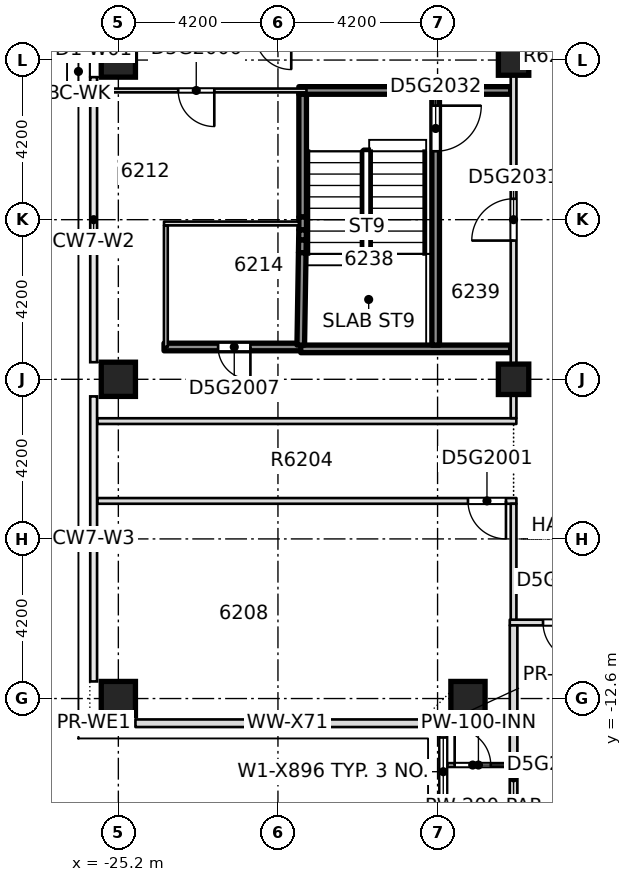
"""IFC4 building model, lengths in metres.
Left out: names, types, materials, properties, quantities, classifications, styles, units other than length and angle.
Written with IfcOpenShell. Run it as: python <this file> out.ifc"""

import sys

from ifc_helpers import new_model, si_unit, direction, frame, frame_2d, origin, origin_2d, place, context, subcontext, project, spatial, rectangle, extrude, element, fill, save


model = new_model("IFC4")
c1 = context("Model", 3, precision=1e-05, world=origin(), true_north=direction((0.0, 1.0)))
c2 = subcontext(c1, "Body", "Model", "MODEL_VIEW")
j1 = project(units=[si_unit("LENGTHUNIT", "METRE"), si_unit("PLANEANGLEUNIT", "RADIAN")], contexts=[c1])
p1 = place(None, origin())
s1 = spatial("IfcSite", under=j1, at=p1, CompositionType="ELEMENT")
p2 = place(p1, origin())
s2 = spatial("IfcBuilding", under=s1, at=p2, CompositionType="ELEMENT")
p3 = place(p2, frame((0.0, 0.0, 237.25)))
s3 = spatial("IfcBuildingStorey", under=s2, at=p3, CompositionType="ELEMENT", Elevation=237.25)
for number, where, z_axis, x_axis in (
    (1, (-25.2, -12.6, -0.4), (0.0, 0.0, 1.0), (1.0, 0.0, 0.0)),
    (2, (-16.0, -12.6, -0.4), (0.0, 0.0, 1.0), (1.0, 0.0, 0.0)),
    (3, (-25.2, -4.2, -0.4), (0.0, 0.0, 1.0), (1.0, 0.0, 0.0)),
    (4, (-25.2, 4.2, -0.4), (0.0, 0.0, 1.0), (1.0, 0.0, 0.0)),
):
    element("IfcColumn", number, at=place(p3, frame(where, z_axis=z_axis, x_axis=x_axis)), inside=s3, PredefinedType="COLUMN", context=c2, shape_type="SweptSolid", body=[
        extrude(rectangle(XDim=0.9, YDim=0.9, at=origin_2d()), origin(), (0.0, 0.0, 1.0), 3.45),
    ])
for number, where, z_axis, x_axis in (
    (5, (-14.8, -4.2, -0.4), (0.0, 0.0, 1.0), (1.0, 0.0, 0.0)),
    (6, (-14.8, 4.2, -0.4), (0.0, 0.0, 1.0), (1.0, 0.0, 0.0)),
):
    element("IfcColumn", number, at=place(p3, frame(where, z_axis=z_axis, x_axis=x_axis)), inside=s3, PredefinedType="COLUMN", context=c2, shape_type="SweptSolid", body=[
        extrude(rectangle(XDim=0.8, YDim=0.8, at=origin_2d()), origin(), (0.0, 0.0, 1.0), 3.45),
    ])
p4 = place(p3, frame((-16.55, -14.35, 0.0), z_axis=(0.0, 0.0, 1.0), x_axis=(1.0, 0.0, 0.0)))
e7 = element("IfcWall", 7, at=p4, inside=s3, PredefinedType="PARTITIONING", context=c2, shape_type="SweptSolid", body=[
    extrude(rectangle(XDim=1.65, YDim=0.1, at=frame_2d((0.825, 0.0))), origin(), (0.0, 0.0, 1.0), 3.05),
])
p5 = place(p4, frame((0.2, 0.0, 0.0)))
e8 = element("IfcOpeningElement", 8, at=p5, cuts=e7, PredefinedType="OPENING", context=c2, shape_type="SweptSolid", body=[
    extrude(rectangle(XDim=0.95, YDim=2.1, at=frame_2d((0.475, 1.05))), frame((0.0, 0.06, 0.0), z_axis=(0.0, -1.0, 0.0), x_axis=(1.0, 0.0, 0.0)), (0.0, 0.0, 1.0), 0.12),
])
p6 = place(p3, frame((-14.9, -10.6, 0.0), z_axis=(0.0, 0.0, 1.0), x_axis=(1.0, 0.0, 0.0)))
e9 = element("IfcWall", 9, at=p6, inside=s3, PredefinedType="PARTITIONING", context=c2, shape_type="SweptSolid", body=[
    extrude(rectangle(XDim=20.8, YDim=0.15, at=frame_2d((10.4, 0.0))), origin(), (0.0, 0.0, 1.0), 3.05),
])
p7 = place(p6, frame((9.225, 0.0, 0.0)))
e10 = element("IfcOpeningElement", 10, at=p7, cuts=e9, PredefinedType="OPENING", context=c2, shape_type="SweptSolid", body=[
    extrude(rectangle(XDim=0.95, YDim=2.1, at=frame_2d((0.475, 1.05))), frame((0.0, 0.085, 0.0), z_axis=(0.0, -1.0, 0.0), x_axis=(1.0, 0.0, 0.0)), (0.0, 0.0, 1.0), 0.17),
])
p8 = place(p6, frame((18.275, 0.0, 0.0)))
e11 = element("IfcOpeningElement", 11, at=p8, cuts=e9, PredefinedType="OPENING", context=c2, shape_type="SweptSolid", body=[
    extrude(rectangle(XDim=0.95, YDim=2.1, at=frame_2d((0.475, 1.05))), frame((0.0, 0.085, 0.0), z_axis=(0.0, -1.0, 0.0), x_axis=(1.0, 0.0, 0.0)), (0.0, 0.0, 1.0), 0.17),
])
p9 = place(p6, frame((3.95, 0.0, 0.0)))
e12 = element("IfcOpeningElement", 12, at=p9, cuts=e9, PredefinedType="OPENING", context=c2, shape_type="SweptSolid", body=[
    extrude(rectangle(XDim=1.1, YDim=2.1, at=frame_2d((0.55, 1.05))), frame((0.0, 0.085, 0.0), z_axis=(0.0, -1.0, 0.0), x_axis=(1.0, 0.0, 0.0)), (0.0, 0.0, 1.0), 0.17),
])
p10 = place(p6, frame((15.4, 0.0, 0.0)))
e13 = element("IfcOpeningElement", 13, at=p10, cuts=e9, PredefinedType="OPENING", context=c2, shape_type="SweptSolid", body=[
    extrude(rectangle(XDim=1.1, YDim=2.1, at=frame_2d((0.55, 1.05))), frame((0.0, 0.085, 0.0), z_axis=(0.0, -1.0, 0.0), x_axis=(1.0, 0.0, 0.0)), (0.0, 0.0, 1.0), 0.17),
])
p11 = place(p6, frame((0.875, 0.0, 0.0)))
e14 = element("IfcOpeningElement", 14, at=p11, cuts=e9, PredefinedType="OPENING", context=c2, shape_type="SweptSolid", body=[
    extrude(rectangle(XDim=1.0, YDim=2.1, at=frame_2d((0.5, 1.05))), frame((0.0, 0.085, 0.0), z_axis=(0.0, -1.0, 0.0), x_axis=(1.0, 0.0, 0.0)), (0.0, 0.0, 1.0), 0.17),
])
p12 = place(p3, frame((-25.75, -7.4, 0.0), z_axis=(0.0, 0.0, 1.0), x_axis=(1.0, 0.0, 0.0)))
e15 = element("IfcWall", 15, at=p12, inside=s3, PredefinedType="PARTITIONING", context=c2, shape_type="SweptSolid", body=[
    extrude(rectangle(XDim=11.025, YDim=0.15, at=frame_2d((5.512, 0.0))), origin(), (0.0, 0.0, 1.0), 3.05),
])
p13 = place(p12, frame((9.75, 0.0, 0.0)))
e16 = element("IfcOpeningElement", 16, at=p13, cuts=e15, PredefinedType="OPENING", context=c2, shape_type="SweptSolid", body=[
    extrude(rectangle(XDim=1.0, YDim=2.1, at=frame_2d((0.5, 1.05))), frame((0.0, 0.085, 0.0), z_axis=(0.0, -1.0, 0.0), x_axis=(1.0, 0.0, 0.0)), (0.0, 0.0, 1.0), 0.17),
])
p14 = place(p3, frame((-25.75, -5.3, 0.0), z_axis=(0.0, 0.0, 1.0), x_axis=(1.0, 0.0, 0.0)))
e17 = element("IfcWall", 17, at=p14, inside=s3, PredefinedType="PARTITIONING", context=c2, shape_type="SweptSolid", body=[
    extrude(rectangle(XDim=11.023, YDim=0.15, at=frame_2d((5.511, 0.0))), origin(), (0.0, 0.0, 1.0), 3.05),
])
p15 = place(p3, frame((-23.998, -3.35, 0.0), z_axis=(0.0, 0.0, 1.0), x_axis=(1.0, 0.0, 0.0)))
e18 = element("IfcWall", 18, at=p15, inside=s3, PredefinedType="SOLIDWALL", context=c2, shape_type="SweptSolid", body=[
    extrude(rectangle(XDim=3.698, YDim=0.2, at=frame_2d((1.849, 0.0))), origin(), (0.0, 0.0, 1.0), 3.05),
])
p16 = place(p15, frame((1.423, 0.0, 0.0)))
e19 = element("IfcOpeningElement", 19, at=p16, cuts=e18, PredefinedType="OPENING", context=c2, shape_type="SweptSolid", body=[
    extrude(rectangle(XDim=0.85, YDim=2.1, at=frame_2d((0.425, 1.05))), frame((0.0, 0.11, 0.0), z_axis=(0.0, -1.0, 0.0), x_axis=(1.0, 0.0, 0.0)), (0.0, 0.0, 1.0), 0.22),
])
p17 = place(p3, frame((-20.4, -3.4, 0.0), z_axis=(0.0, 0.0, 1.0), x_axis=(1.0, 0.0, 0.0)))
e20 = element("IfcWall", 20, at=p17, inside=s3, PredefinedType="SOLIDWALL", context=c2, shape_type="SweptSolid", body=[
    extrude(rectangle(XDim=5.523, YDim=0.2, at=frame_2d((2.761, 0.0))), origin(), (0.0, 0.0, 1.0), 3.05),
])
p18 = place(p3, frame((-23.998, -0.1, 0.0), z_axis=(0.0, 0.0, 1.0), x_axis=(1.0, 0.0, 0.0)))
e21 = element("IfcWall", 21, at=p18, inside=s3, PredefinedType="PARTITIONING", context=c2, shape_type="SweptSolid", body=[
    extrude(rectangle(XDim=3.548, YDim=0.1, at=frame_2d((1.774, 0.0))), origin(), (0.0, 0.0, 1.0), 3.05),
])
p19 = place(p3, frame((-25.75, 3.4, 0.0), z_axis=(0.0, 0.0, 1.0), x_axis=(1.0, 0.0, 0.0)))
e22 = element("IfcWall", 22, at=p19, inside=s3, PredefinedType="PARTITIONING", context=c2, shape_type="SweptSolid", body=[
    extrude(rectangle(XDim=5.5, YDim=0.1, at=frame_2d((2.75, 0.0))), origin(), (0.0, 0.0, 1.0), 3.05),
])
p20 = place(p19, frame((2.125, 0.0, 0.0)))
e23 = element("IfcOpeningElement", 23, at=p20, cuts=e22, PredefinedType="OPENING", context=c2, shape_type="SweptSolid", body=[
    extrude(rectangle(XDim=0.95, YDim=2.1, at=frame_2d((0.475, 1.05))), frame((0.0, 0.06, 0.0), z_axis=(0.0, -1.0, 0.0), x_axis=(1.0, 0.0, 0.0)), (0.0, 0.0, 1.0), 0.12),
])
p21 = place(p3, frame((-20.45, 3.4, 0.0), z_axis=(0.0, 0.0, 1.0), x_axis=(1.0, 0.0, 0.0)))
e24 = element("IfcWall", 24, at=p21, inside=s3, PredefinedType="SOLIDWALL", context=c2, shape_type="SweptSolid", body=[
    extrude(rectangle(XDim=5.575, YDim=0.2, at=frame_2d((2.788, 0.0))), origin(), (0.0, 0.0, 1.0), 3.05),
])
p22 = place(p3, frame((-23.95, -3.348, 0.0), z_axis=(0.0, 0.0, 1.0), x_axis=(0.0, 1.0, 0.0)))
e25 = element("IfcWall", 25, at=p22, inside=s3, PredefinedType="PARTITIONING", context=c2, shape_type="SweptSolid", body=[
    extrude(rectangle(XDim=3.196, YDim=0.1, at=frame_2d((1.598, 0.0))), origin(), (0.0, 0.0, 1.0), 3.05),
])
p23 = place(p3, frame((-20.361, -0.87, 0.0), z_axis=(0.0, 0.0, 1.0), x_axis=(0.015779957498, 0.999875488719, 0.0)))
e26 = element("IfcWall", 26, at=p23, inside=s3, PredefinedType="SOLIDWALL", context=c2, shape_type="SweptSolid", body=[
    extrude(rectangle(XDim=0.34, YDim=0.2, at=frame_2d((0.17, 0.0))), origin(), (0.0, 0.0, 1.0), 3.05),
])
p24 = place(p3, frame((-20.35, 0.07, 0.0), z_axis=(0.0, 0.0, 1.0), x_axis=(0.0, 1.0, 0.0)))
e27 = element("IfcWall", 27, at=p24, inside=s3, PredefinedType="SOLIDWALL", context=c2, shape_type="SweptSolid", body=[
    extrude(rectangle(XDim=3.23, YDim=0.2, at=frame_2d((1.615, 0.0))), origin(), (0.0, 0.0, 1.0), 3.05),
])
p25 = place(p3, frame((-16.85, -3.3, 0.0), z_axis=(0.0, 0.0, 1.0), x_axis=(0.0, 1.0, 0.0)))
e28 = element("IfcWall", 28, at=p25, inside=s3, PredefinedType="SOLIDWALL", context=c2, shape_type="SweptSolid", body=[
    extrude(rectangle(XDim=6.6, YDim=0.2, at=frame_2d((3.3, 0.0))), origin(), (0.0, 0.0, 1.0), 3.05),
])
p26 = place(p25, frame((5.1, 0.0, 0.0)))
e29 = element("IfcOpeningElement", 29, at=p26, cuts=e28, PredefinedType="OPENING", context=c2, shape_type="SweptSolid", body=[
    extrude(rectangle(XDim=1.2, YDim=2.1, at=frame_2d((0.6, 1.05))), frame((0.0, 0.11, 0.0), z_axis=(0.0, -1.0, 0.0), x_axis=(1.0, 0.0, 0.0)), (0.0, 0.0, 1.0), 0.22),
])
p27 = place(p3, frame((-14.8, -18.7, 0.0), z_axis=(0.0, 0.0, 1.0), x_axis=(0.0, 1.0, 0.0)))
e30 = element("IfcWall", 30, at=p27, inside=s3, PredefinedType="PARTITIONING", context=c2, shape_type="SweptSolid", body=[
    extrude(rectangle(XDim=8.025, YDim=0.2, at=frame_2d((4.012, 0.0))), origin(), (0.0, 0.0, 1.0), 3.05),
])
p28 = place(p3, frame((-14.8, -10.525, 0.0), z_axis=(0.0, 0.0, 1.0), x_axis=(0.0, 1.0, 0.0)))
e31 = element("IfcWall", 31, at=p28, inside=s3, PredefinedType="PARTITIONING", context=c2, shape_type="SweptSolid", body=[
    extrude(rectangle(XDim=3.05, YDim=0.15, at=frame_2d((1.525, 0.0))), origin(), (0.0, 0.0, 1.0), 3.05),
])
p29 = place(p3, frame((-14.8, -5.223, 0.0), z_axis=(0.0, 0.0, 1.0), x_axis=(0.0, 1.0, 0.0)))
e32 = element("IfcWall", 32, at=p29, inside=s3, PredefinedType="PARTITIONING", context=c2, shape_type="SweptSolid", body=[
    extrude(rectangle(XDim=17.748, YDim=0.15, at=frame_2d((8.874, 0.0))), origin(), (0.0, 0.0, 1.0), 3.05),
])
p30 = place(p29, frame((12.723, 0.0, 0.0)))
e33 = element("IfcOpeningElement", 33, at=p30, cuts=e32, PredefinedType="OPENING", context=c2, shape_type="SweptSolid", body=[
    extrude(rectangle(XDim=1.0, YDim=2.1, at=frame_2d((0.5, 1.05))), frame((0.0, 0.085, 0.0), z_axis=(0.0, -1.0, 0.0), x_axis=(1.0, 0.0, 0.0)), (0.0, 0.0, 1.0), 0.17),
])
p31 = place(p29, frame((4.673, 0.0, 0.0)))
e34 = element("IfcOpeningElement", 34, at=p31, cuts=e32, PredefinedType="OPENING", context=c2, shape_type="SweptSolid", body=[
    extrude(rectangle(XDim=1.1, YDim=2.1, at=frame_2d((0.55, 1.05))), frame((0.0, 0.085, 0.0), z_axis=(0.0, -1.0, 0.0), x_axis=(1.0, 0.0, 0.0)), (0.0, 0.0, 1.0), 0.17),
])
p32 = place(p3, frame((-24.75, -13.25, 0.0), z_axis=(0.0, 0.0, 1.0), x_axis=(1.0, 0.0, 0.0)))
e35 = element("IfcWall", 35, at=p32, inside=s3, PredefinedType="STANDARD", context=c2, shape_type="SweptSolid", body=[
    extrude(rectangle(XDim=8.0, YDim=0.2, at=frame_2d((4.0, 0.0))), origin(), (0.0, 0.0, 1.0), 3.05),
])
p33 = place(p3, frame((-16.65, -13.35, 0.0), z_axis=(0.0, 0.0, 1.0), x_axis=(0.0, -1.0, 0.0)))
e36 = element("IfcWall", 36, at=p33, inside=s3, PredefinedType="STANDARD", context=c2, shape_type="SweptSolid", body=[
    extrude(rectangle(XDim=7.2, YDim=0.2, at=frame_2d((3.6, 0.0))), origin(), (0.0, 0.0, 1.0), 3.05),
])
p34 = place(p33, frame((3.42, 0.0, 0.2)))
e37 = element("IfcOpeningElement", 37, at=p34, cuts=e36, PredefinedType="OPENING", context=c2, shape_type="SweptSolid", body=[
    extrude(rectangle(XDim=1.8, YDim=2.65, at=frame_2d((0.9, 1.325))), frame((0.0, 0.11, 0.0), z_axis=(0.0, -1.0, 0.0), x_axis=(1.0, 0.0, 0.0)), (0.0, 0.0, 1.0), 0.22),
])
p35 = place(p33, frame((0.275, 0.0, 0.2)))
e38 = element("IfcOpeningElement", 38, at=p35, cuts=e36, PredefinedType="OPENING", context=c2, shape_type="SweptSolid", body=[
    extrude(rectangle(XDim=1.8, YDim=2.65, at=frame_2d((0.9, 1.325))), frame((0.0, 0.11, 0.0), z_axis=(0.0, -1.0, 0.0), x_axis=(1.0, 0.0, 0.0)), (0.0, 0.0, 1.0), 0.22),
])
p36 = place(p3, frame((-20.35, -0.27, 0.0), z_axis=(0.0, 0.0, 1.0), x_axis=(0.0, 1.0, 0.0)))
e39 = element("IfcWall", 39, at=p36, inside=s3, PredefinedType="SOLIDWALL", context=c2, shape_type="SweptSolid", body=[
    extrude(rectangle(XDim=0.34, YDim=0.2, at=frame_2d((0.17, 0.0))), origin(), (0.0, 0.0, 1.0), 3.05),
])
p37 = place(p3, frame((-20.4, -3.3, 0.0), z_axis=(0.0, 0.0, 1.0), x_axis=(0.016173911403, 0.99986919374, 0.0)))
e40 = element("IfcWall", 40, at=p37, inside=s3, PredefinedType="SOLIDWALL", context=c2, shape_type="SweptSolid", body=[
    extrude(rectangle(XDim=2.43, YDim=0.2, at=frame_2d((1.215, 0.0))), origin(), (0.0, 0.0, 1.0), 3.05),
])
p38 = place(p3, frame((-20.355, -0.53, 0.0), z_axis=(0.0, 0.0, 1.0), x_axis=(0.015975404649, 0.99987238508, 0.0)))
e41 = element("IfcWall", 41, at=p38, inside=s3, PredefinedType="SOLIDWALL", context=c2, shape_type="SweptSolid", body=[
    extrude(rectangle(XDim=0.26, YDim=0.2, at=frame_2d((0.13, 0.0))), origin(), (0.0, 0.0, 1.0), 3.05),
])
p39 = place(p13, origin())
e42 = element("IfcDoor", 42, at=p39, inside=s3, OperationType="SINGLE_SWING_RIGHT", PredefinedType="DOOR", context=c2, shape_type="SweptSolid", body=[
    extrude(rectangle(XDim=1.0, YDim=2.1, at=frame_2d((0.5, 1.05))), frame((0.0, 0.025, 0.0), z_axis=(0.0, -1.0, 0.0), x_axis=(1.0, 0.0, 0.0)), (0.0, 0.0, 1.0), 0.05),
])
fill(e16, e42)
p40 = place(p5, origin())
e43 = element("IfcDoor", 43, at=p40, inside=s3, OperationType="SINGLE_SWING_RIGHT", PredefinedType="DOOR", context=c2, shape_type="SweptSolid", body=[
    extrude(rectangle(XDim=0.95, YDim=2.1, at=frame_2d((0.475, 1.05))), frame((0.0, 0.025, 0.0), z_axis=(0.0, -1.0, 0.0), x_axis=(1.0, 0.0, 0.0)), (0.0, 0.0, 1.0), 0.05),
])
fill(e8, e43)
p41 = place(p20, origin())
e44 = element("IfcDoor", 44, at=p41, inside=s3, OperationType="SINGLE_SWING_LEFT", PredefinedType="DOOR", context=c2, shape_type="SweptSolid", body=[
    extrude(rectangle(XDim=0.95, YDim=2.1, at=frame_2d((0.475, 1.05))), frame((0.0, 0.025, 0.0), z_axis=(0.0, -1.0, 0.0), x_axis=(1.0, 0.0, 0.0)), (0.0, 0.0, 1.0), 0.05),
])
fill(e23, e44)
p42 = place(p16, origin())
e45 = element("IfcDoor", 45, at=p42, inside=s3, OperationType="SINGLE_SWING_LEFT", PredefinedType="DOOR", context=c2, shape_type="SweptSolid", body=[
    extrude(rectangle(XDim=0.85, YDim=2.1, at=frame_2d((0.425, 1.05))), frame((0.0, 0.025, 0.0), z_axis=(0.0, -1.0, 0.0), x_axis=(1.0, 0.0, 0.0)), (0.0, 0.0, 1.0), 0.05),
])
fill(e19, e45)
p43 = place(p31, origin())
e46 = element("IfcDoor", 46, at=p43, inside=s3, OperationType="SINGLE_SWING_LEFT", PredefinedType="DOOR", context=c2, shape_type="SweptSolid", body=[
    extrude(rectangle(XDim=1.1, YDim=2.1, at=frame_2d((0.55, 1.05))), frame((0.0, 0.025, 0.0), z_axis=(0.0, -1.0, 0.0), x_axis=(1.0, 0.0, 0.0)), (0.0, 0.0, 1.0), 0.05),
])
fill(e34, e46)
p44 = place(p26, origin())
e47 = element("IfcDoor", 47, at=p44, inside=s3, OperationType="SINGLE_SWING_RIGHT", PredefinedType="DOOR", context=c2, shape_type="SweptSolid", body=[
    extrude(rectangle(XDim=1.2, YDim=2.1, at=frame_2d((0.6, 1.05))), frame((0.0, 0.025, 0.0), z_axis=(0.0, -1.0, 0.0), x_axis=(1.0, 0.0, 0.0)), (0.0, 0.0, 1.0), 0.05),
])
fill(e29, e47)
p45 = place(p11, origin())
e48 = element("IfcDoor", 48, at=p45, inside=s3, OperationType="SINGLE_SWING_RIGHT", PredefinedType="DOOR", context=c2, shape_type="SweptSolid", body=[
    extrude(rectangle(XDim=1.0, YDim=2.1, at=frame_2d((0.5, 1.05))), frame((0.0, 0.025, 0.0), z_axis=(0.0, -1.0, 0.0), x_axis=(1.0, 0.0, 0.0)), (0.0, 0.0, 1.0), 0.05),
])
fill(e14, e48)
p46 = place(p35, origin())
e49 = element("IfcWindow", 49, at=p46, inside=s3, PartitioningType="SINGLE_PANEL", PredefinedType="WINDOW", context=c2, shape_type="SweptSolid", body=[
    extrude(rectangle(XDim=1.8, YDim=2.65, at=frame_2d((0.9, 1.325))), frame((0.0, 0.03, 0.0), z_axis=(0.0, -1.0, 0.0), x_axis=(1.0, 0.0, 0.0)), (0.0, 0.0, 1.0), 0.06),
])
fill(e38, e49)
save(model, sys.argv[1])
